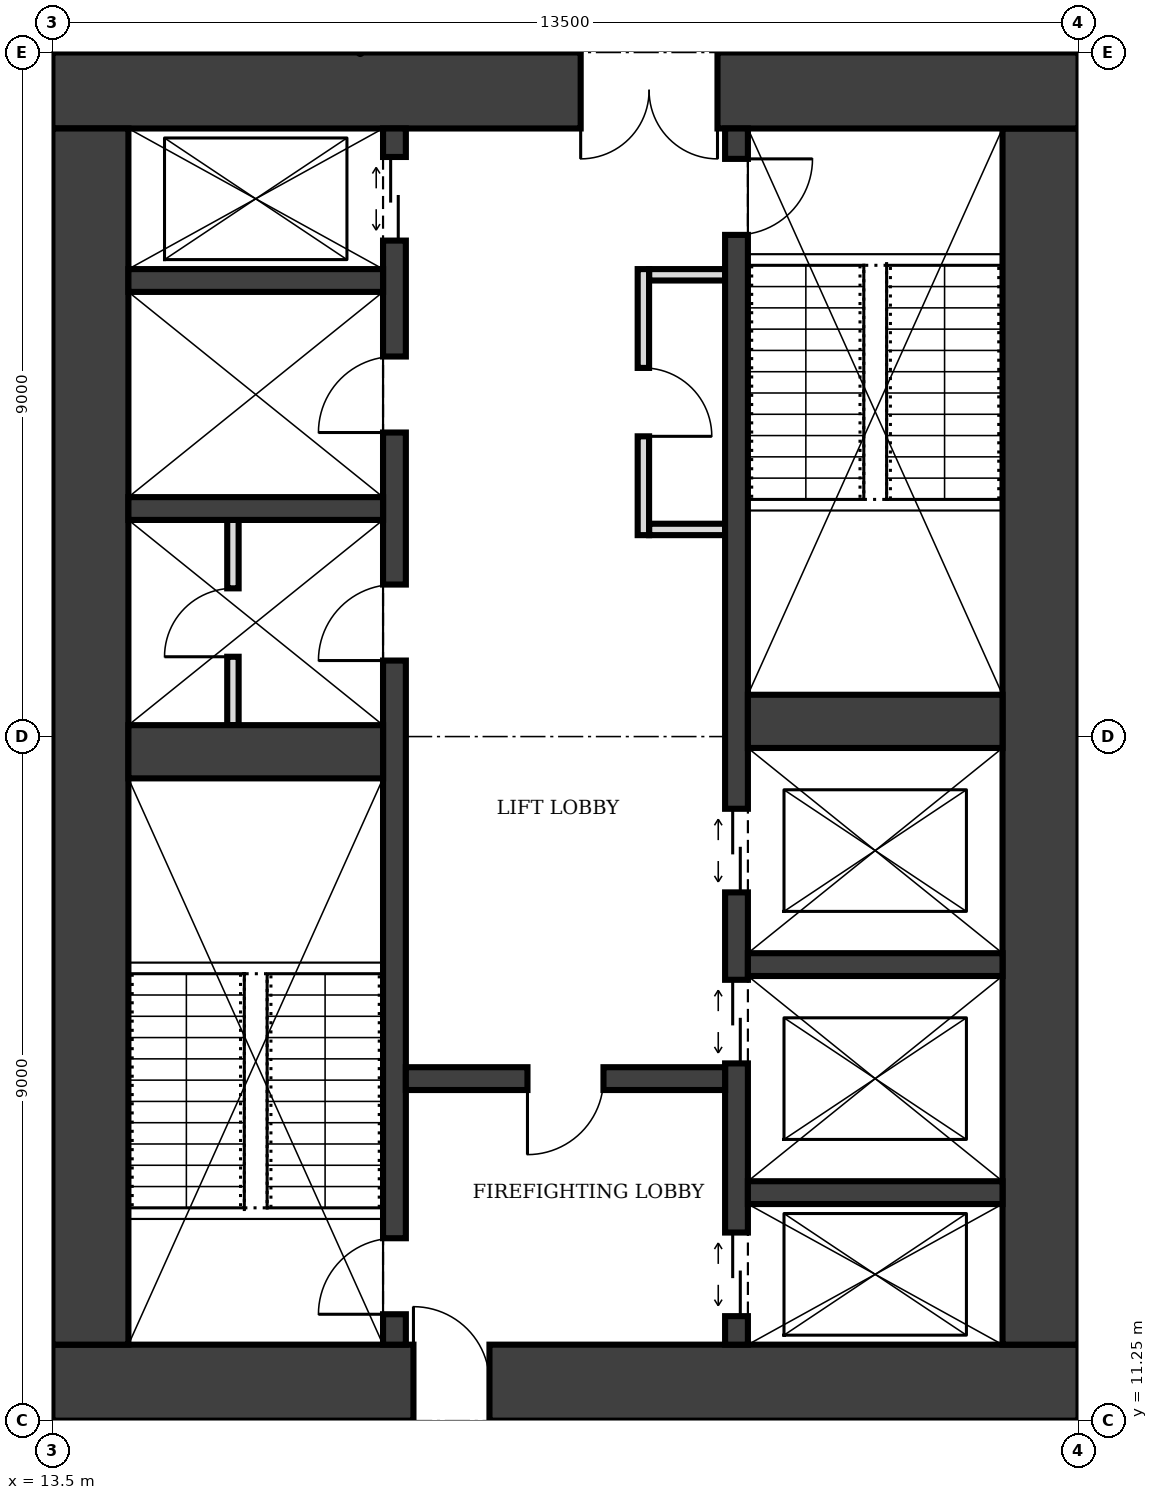
"""IFC4 building model, lengths in metres.
Left out: names, types, materials, properties, quantities, classifications, styles, units other than length and angle.
Written with IfcOpenShell. Run it as: python <this file> out.ifc"""

import sys

from ifc_helpers import new_model, si_unit, direction, frame, frame_2d, origin, place, context, subcontext, project, spatial, rectangle, extrude, element, fill, save


model = new_model("IFC4")
c1 = context("Model", 3, precision=1e-05, world=origin(), true_north=direction((0.0, 1.0)))
c2 = subcontext(c1, "Body", "Model", "MODEL_VIEW")
j1 = project(units=[si_unit("LENGTHUNIT", "METRE"), si_unit("PLANEANGLEUNIT", "RADIAN")], contexts=[c1])
p1 = place(None, origin())
s1 = spatial("IfcSite", under=j1, at=p1, CompositionType="ELEMENT")
p2 = place(p1, origin())
s2 = spatial("IfcBuilding", under=s1, at=p2, CompositionType="ELEMENT")
p3 = place(p2, frame((0.0, 0.0, 185.0)))
s3 = spatial("IfcBuildingStorey", under=s2, at=p3, CompositionType="ELEMENT", Elevation=185.0)
p4 = place(p3, frame((13.5, 11.75, 0.0), z_axis=(0.0, 0.0, 1.0), x_axis=(1.0, 0.0, 0.0)))
e1 = element("IfcWall", 1, at=p4, inside=s3, PredefinedType="SHEAR", context=c2, shape_type="SweptSolid", body=[
    extrude(rectangle(XDim=13.5, YDim=1.0, at=frame_2d((6.75, 0.0))), origin(), (0.0, 0.0, 1.0), 4.0),
])
p5 = place(p4, frame((4.75, 0.0, 0.0)))
e2 = element("IfcOpeningElement", 2, at=p5, cuts=e1, PredefinedType="OPENING", context=c2, shape_type="SweptSolid", body=[
    extrude(rectangle(XDim=1.0, YDim=2.1, at=frame_2d((0.5, 1.05))), frame((0.0, 0.51, 0.0), z_axis=(0.0, -1.0, 0.0), x_axis=(1.0, 0.0, 0.0)), (0.0, 0.0, 1.0), 1.02),
])
p6 = place(p3, frame((26.5, 12.25, 0.0), z_axis=(0.0, 0.0, 1.0), x_axis=(0.0, 1.0, 0.0)))
e3 = element("IfcWall", 3, at=p6, inside=s3, PredefinedType="SHEAR", context=c2, shape_type="SweptSolid", body=[
    extrude(rectangle(XDim=16.0, YDim=1.0, at=frame_2d((8.0, 0.0))), origin(), (0.0, 0.0, 1.0), 4.0),
])
p7 = place(p3, frame((27.0, 28.75, 0.0), z_axis=(0.0, 0.0, 1.0), x_axis=(-1.0, 0.0, 0.0)))
e4 = element("IfcWall", 4, at=p7, inside=s3, PredefinedType="SHEAR", context=c2, shape_type="SweptSolid", body=[
    extrude(rectangle(XDim=13.5, YDim=1.0, at=frame_2d((6.75, 0.0))), origin(), (0.0, 0.0, 1.0), 4.0),
])
p8 = place(p7, frame((4.75, 0.0, 0.0)))
e5 = element("IfcOpeningElement", 5, at=p8, cuts=e4, PredefinedType="OPENING", context=c2, shape_type="SweptSolid", body=[
    extrude(rectangle(XDim=1.8, YDim=2.1, at=frame_2d((0.9, 1.05))), frame((0.0, 0.51, 0.0), z_axis=(0.0, -1.0, 0.0), x_axis=(1.0, 0.0, 0.0)), (0.0, 0.0, 1.0), 1.02),
])
p9 = place(p3, frame((14.0, 28.25, 0.0), z_axis=(0.0, 0.0, 1.0), x_axis=(0.0, -1.0, 0.0)))
e6 = element("IfcWall", 6, at=p9, inside=s3, PredefinedType="SHEAR", context=c2, shape_type="SweptSolid", body=[
    extrude(rectangle(XDim=16.0, YDim=1.0, at=frame_2d((8.0, 0.0))), origin(), (0.0, 0.0, 1.0), 4.0),
])
p10 = place(p3, frame((18.0, 12.25, 0.0), z_axis=(0.0, 0.0, 1.0), x_axis=(0.0, 1.0, 0.0)))
e7 = element("IfcWall", 7, at=p10, inside=s3, PredefinedType="SHEAR", context=c2, shape_type="SweptSolid", body=[
    extrude(rectangle(XDim=16.0, YDim=0.3, at=frame_2d((8.0, 0.0))), origin(), (0.0, 0.0, 1.0), 4.0),
])
p11 = place(p10, frame((0.4, 0.0, 0.0)))
e8 = element("IfcOpeningElement", 8, at=p11, cuts=e7, PredefinedType="OPENING", context=c2, shape_type="SweptSolid", body=[
    extrude(rectangle(XDim=1.0, YDim=2.1, at=frame_2d((0.5, 1.05))), frame((0.0, 0.16, 0.0), z_axis=(0.0, -1.0, 0.0), x_axis=(1.0, 0.0, 0.0)), (0.0, 0.0, 1.0), 0.32),
])
p12 = place(p10, frame((14.525, 0.0, 0.0)))
e9 = element("IfcOpeningElement", 9, at=p12, cuts=e7, PredefinedType="OPENING", context=c2, shape_type="SweptSolid", body=[
    extrude(rectangle(XDim=1.1, YDim=2.1, at=frame_2d((0.55, 1.05))), frame((0.0, 0.16, 0.0), z_axis=(0.0, -1.0, 0.0), x_axis=(1.0, 0.0, 0.0)), (0.0, 0.0, 1.0), 0.32),
])
p13 = place(p10, frame((9.0, 0.0, 0.0)))
e10 = element("IfcOpeningElement", 10, at=p13, cuts=e7, PredefinedType="OPENING", context=c2, shape_type="SweptSolid", body=[
    extrude(rectangle(XDim=1.0, YDim=2.1, at=frame_2d((0.5, 1.05))), frame((0.0, 0.16, 0.0), z_axis=(0.0, -1.0, 0.0), x_axis=(1.0, 0.0, 0.0)), (0.0, 0.0, 1.0), 0.32),
])
p14 = place(p10, frame((12.0, 0.0, 0.0)))
e11 = element("IfcOpeningElement", 11, at=p14, cuts=e7, PredefinedType="OPENING", context=c2, shape_type="SweptSolid", body=[
    extrude(rectangle(XDim=1.0, YDim=2.1, at=frame_2d((0.5, 1.05))), frame((0.0, 0.16, 0.0), z_axis=(0.0, -1.0, 0.0), x_axis=(1.0, 0.0, 0.0)), (0.0, 0.0, 1.0), 0.32),
])
p15 = place(p3, frame((22.5, 12.25, 0.0), z_axis=(0.0, 0.0, 1.0), x_axis=(0.0, 1.0, 0.0)))
e12 = element("IfcWall", 12, at=p15, inside=s3, PredefinedType="SHEAR", context=c2, shape_type="SweptSolid", body=[
    extrude(rectangle(XDim=16.0, YDim=0.3, at=frame_2d((8.0, 0.0))), origin(), (0.0, 0.0, 1.0), 4.0),
])
p16 = place(p15, frame((14.6, 0.0, 0.0)))
e13 = element("IfcOpeningElement", 13, at=p16, cuts=e12, PredefinedType="OPENING", context=c2, shape_type="SweptSolid", body=[
    extrude(rectangle(XDim=1.0, YDim=2.1, at=frame_2d((0.5, 1.05))), frame((0.0, 0.16, 0.0), z_axis=(0.0, -1.0, 0.0), x_axis=(1.0, 0.0, 0.0)), (0.0, 0.0, 1.0), 0.32),
])
p17 = place(p15, frame((0.375, 0.0, 0.0)))
e14 = element("IfcOpeningElement", 14, at=p17, cuts=e12, PredefinedType="OPENING", context=c2, shape_type="SweptSolid", body=[
    extrude(rectangle(XDim=1.1, YDim=2.1, at=frame_2d((0.55, 1.05))), frame((0.0, 0.16, 0.0), z_axis=(0.0, -1.0, 0.0), x_axis=(1.0, 0.0, 0.0)), (0.0, 0.0, 1.0), 0.32),
])
p18 = place(p15, frame((3.7, 0.0, 0.0)))
e15 = element("IfcOpeningElement", 15, at=p18, cuts=e12, PredefinedType="OPENING", context=c2, shape_type="SweptSolid", body=[
    extrude(rectangle(XDim=1.1, YDim=2.1, at=frame_2d((0.55, 1.05))), frame((0.0, 0.16, 0.0), z_axis=(0.0, -1.0, 0.0), x_axis=(1.0, 0.0, 0.0)), (0.0, 0.0, 1.0), 0.32),
])
p19 = place(p15, frame((5.95, 0.0, 0.0)))
e16 = element("IfcOpeningElement", 16, at=p19, cuts=e12, PredefinedType="OPENING", context=c2, shape_type="SweptSolid", body=[
    extrude(rectangle(XDim=1.1, YDim=2.1, at=frame_2d((0.55, 1.05))), frame((0.0, 0.16, 0.0), z_axis=(0.0, -1.0, 0.0), x_axis=(1.0, 0.0, 0.0)), (0.0, 0.0, 1.0), 0.32),
])
p20 = place(p3, frame((14.5, 20.05, 0.0), z_axis=(0.0, 0.0, 1.0), x_axis=(1.0, 0.0, 0.0)))
e17 = element("IfcWall", 17, at=p20, inside=s3, PredefinedType="SHEAR", context=c2, shape_type="SweptSolid", body=[
    extrude(rectangle(XDim=3.35, YDim=0.7, at=frame_2d((1.675, 0.0))), origin(), (0.0, 0.0, 1.0), 4.0),
])
p21 = place(p3, frame((18.15, 15.75, 0.0), z_axis=(0.0, 0.0, 1.0), x_axis=(1.0, 0.0, 0.0)))
e18 = element("IfcWall", 18, at=p21, inside=s3, PredefinedType="SHEAR", context=c2, shape_type="SweptSolid", body=[
    extrude(rectangle(XDim=4.2, YDim=0.3, at=frame_2d((2.1, 0.0))), origin(), (0.0, 0.0, 1.0), 4.0),
])
p22 = place(p21, frame((1.6, 0.0, 0.0)))
e19 = element("IfcOpeningElement", 19, at=p22, cuts=e18, PredefinedType="OPENING", context=c2, shape_type="SweptSolid", body=[
    extrude(rectangle(XDim=1.0, YDim=2.1, at=frame_2d((0.5, 1.05))), frame((0.0, 0.16, 0.0), z_axis=(0.0, -1.0, 0.0), x_axis=(1.0, 0.0, 0.0)), (0.0, 0.0, 1.0), 0.32),
])
for number, where, z_axis, x_axis in (
    (20, (22.65, 14.25, 0.0), (0.0, 0.0, 1.0), (1.0, 0.0, 0.0)),
    (21, (22.65, 17.25, 0.0), (0.0, 0.0, 1.0), (1.0, 0.0, 0.0)),
):
    element("IfcWall", number, at=place(p3, frame(where, z_axis=z_axis, x_axis=x_axis)), inside=s3, PredefinedType="SHEAR", context=c2, shape_type="SweptSolid", body=[
        extrude(rectangle(XDim=3.35, YDim=0.3, at=frame_2d((1.675, 0.0))), origin(), (0.0, 0.0, 1.0), 4.0),
    ])
p23 = place(p3, frame((22.65, 20.45, 0.0), z_axis=(0.0, 0.0, 1.0), x_axis=(1.0, 0.0, 0.0)))
e22 = element("IfcWall", 22, at=p23, inside=s3, PredefinedType="SHEAR", context=c2, shape_type="SweptSolid", body=[
    extrude(rectangle(XDim=3.35, YDim=0.7, at=frame_2d((1.675, 0.0))), origin(), (0.0, 0.0, 1.0), 4.0),
])
for number, where, z_axis, x_axis in (
    (23, (14.5, 23.25, 0.0), (0.0, 0.0, 1.0), (1.0, 0.0, 0.0)),
    (24, (14.5, 26.25, 0.0), (0.0, 0.0, 1.0), (1.0, 0.0, 0.0)),
):
    element("IfcWall", number, at=place(p3, frame(where, z_axis=z_axis, x_axis=x_axis)), inside=s3, PredefinedType="SHEAR", context=c2, shape_type="SweptSolid", body=[
        extrude(rectangle(XDim=3.35, YDim=0.3, at=frame_2d((1.675, 0.0))), origin(), (0.0, 0.0, 1.0), 4.0),
    ])
p24 = place(p3, frame((21.275, 22.9, 0.0), z_axis=(0.0, 0.0, 1.0), x_axis=(0.0, 1.0, 0.0)))
e25 = element("IfcWall", 25, at=p24, inside=s3, PredefinedType="PARTITIONING", context=c2, shape_type="SweptSolid", body=[
    extrude(rectangle(XDim=3.5, YDim=0.15, at=frame_2d((1.75, 0.0))), origin(), (0.0, 0.0, 1.0), 3.75),
])
p25 = place(p24, frame((1.3, 0.0, 0.0)))
e26 = element("IfcOpeningElement", 26, at=p25, cuts=e25, PredefinedType="OPENING", context=c2, shape_type="SweptSolid", body=[
    extrude(rectangle(XDim=0.9, YDim=2.1, at=frame_2d((0.45, 1.05))), frame((0.0, 0.085, 0.0), z_axis=(0.0, -1.0, 0.0), x_axis=(1.0, 0.0, 0.0)), (0.0, 0.0, 1.0), 0.17),
])
for number, where, z_axis, x_axis in (
    (27, (21.35, 22.975, 0.0), (0.0, 0.0, 1.0), (1.0, 0.0, 0.0)),
    (28, (21.35, 26.325, 0.0), (0.0, 0.0, 1.0), (1.0, 0.0, 0.0)),
):
    element("IfcWall", number, at=place(p3, frame(where, z_axis=z_axis, x_axis=x_axis)), inside=s3, PredefinedType="PARTITIONING", context=c2, shape_type="SweptSolid", body=[
        extrude(rectangle(XDim=1.0, YDim=0.15, at=frame_2d((0.5, 0.0))), origin(), (0.0, 0.0, 1.0), 3.75),
    ])
p26 = place(p3, frame((15.875, 20.4, 0.0), z_axis=(0.0, 0.0, 1.0), x_axis=(0.0, 1.0, 0.0)))
e29 = element("IfcWall", 29, at=p26, inside=s3, PredefinedType="PARTITIONING", context=c2, shape_type="SweptSolid", body=[
    extrude(rectangle(XDim=2.7, YDim=0.15, at=frame_2d((1.35, 0.0))), origin(), (0.0, 0.0, 1.0), 3.75),
])
p27 = place(p26, frame((0.9, 0.0, 0.0)))
e30 = element("IfcOpeningElement", 30, at=p27, cuts=e29, PredefinedType="OPENING", context=c2, shape_type="SweptSolid", body=[
    extrude(rectangle(XDim=0.9, YDim=2.1, at=frame_2d((0.45, 1.05))), frame((0.0, 0.085, 0.0), z_axis=(0.0, -1.0, 0.0), x_axis=(1.0, 0.0, 0.0)), (0.0, 0.0, 1.0), 0.17),
])
p28 = place(p5, origin())
e31 = element("IfcDoor", 31, at=p28, inside=s3, OperationType="SINGLE_SWING_LEFT", PredefinedType="DOOR", context=c2, shape_type="SweptSolid", body=[
    extrude(rectangle(XDim=1.0, YDim=2.1, at=frame_2d((0.5, 1.05))), frame((0.0, 0.025, 0.0), z_axis=(0.0, -1.0, 0.0), x_axis=(1.0, 0.0, 0.0)), (0.0, 0.0, 1.0), 0.05),
])
fill(e2, e31)
p29 = place(p8, origin())
e32 = element("IfcDoor", 32, at=p29, inside=s3, OperationType="DOUBLE_DOOR_SINGLE_SWING", PredefinedType="DOOR", context=c2, shape_type="SweptSolid", body=[
    extrude(rectangle(XDim=1.8, YDim=2.1, at=frame_2d((0.9, 1.05))), frame((0.0, 0.025, 0.0), z_axis=(0.0, -1.0, 0.0), x_axis=(1.0, 0.0, 0.0)), (0.0, 0.0, 1.0), 0.05),
])
fill(e5, e32)
p30 = place(p22, frame((1.0, 0.0, 0.0), z_axis=(0.0, 0.0, 1.0), x_axis=(-1.0, 0.0, 0.0)))
e33 = element("IfcDoor", 33, at=p30, inside=s3, OperationType="SINGLE_SWING_RIGHT", PredefinedType="DOOR", context=c2, shape_type="SweptSolid", body=[
    extrude(rectangle(XDim=1.0, YDim=2.1, at=frame_2d((0.5, 1.05))), frame((0.0, 0.025, 0.0), z_axis=(0.0, -1.0, 0.0), x_axis=(1.0, 0.0, 0.0)), (0.0, 0.0, 1.0), 0.05),
])
fill(e19, e33)
p31 = place(p11, origin())
e34 = element("IfcDoor", 34, at=p31, inside=s3, OperationType="SINGLE_SWING_LEFT", PredefinedType="DOOR", context=c2, shape_type="SweptSolid", body=[
    extrude(rectangle(XDim=1.0, YDim=2.1, at=frame_2d((0.5, 1.05))), frame((0.0, 0.025, 0.0), z_axis=(0.0, -1.0, 0.0), x_axis=(1.0, 0.0, 0.0)), (0.0, 0.0, 1.0), 0.05),
])
fill(e8, e34)
p32 = place(p16, frame((1.0, 0.0, 0.0), z_axis=(0.0, 0.0, 1.0), x_axis=(-1.0, 0.0, 0.0)))
e35 = element("IfcDoor", 35, at=p32, inside=s3, OperationType="SINGLE_SWING_LEFT", PredefinedType="DOOR", context=c2, shape_type="SweptSolid", body=[
    extrude(rectangle(XDim=1.0, YDim=2.1, at=frame_2d((0.5, 1.05))), frame((0.0, 0.025, 0.0), z_axis=(0.0, -1.0, 0.0), x_axis=(1.0, 0.0, 0.0)), (0.0, 0.0, 1.0), 0.05),
])
fill(e13, e35)
p33 = place(p17, origin())
e36 = element("IfcDoor", 36, at=p33, inside=s3, OperationType="DOUBLE_DOOR_SLIDING", PredefinedType="DOOR", context=c2, shape_type="SweptSolid", body=[
    extrude(rectangle(XDim=1.1, YDim=2.1, at=frame_2d((0.55, 1.05))), frame((0.0, 0.025, 0.0), z_axis=(0.0, -1.0, 0.0), x_axis=(1.0, 0.0, 0.0)), (0.0, 0.0, 1.0), 0.05),
])
fill(e14, e36)
p34 = place(p12, origin())
e37 = element("IfcDoor", 37, at=p34, inside=s3, OperationType="DOUBLE_DOOR_SLIDING", PredefinedType="DOOR", context=c2, shape_type="SweptSolid", body=[
    extrude(rectangle(XDim=1.1, YDim=2.1, at=frame_2d((0.55, 1.05))), frame((0.0, 0.025, 0.0), z_axis=(0.0, -1.0, 0.0), x_axis=(1.0, 0.0, 0.0)), (0.0, 0.0, 1.0), 0.05),
])
fill(e9, e37)
p35 = place(p18, origin())
e38 = element("IfcDoor", 38, at=p35, inside=s3, OperationType="DOUBLE_DOOR_SLIDING", PredefinedType="DOOR", context=c2, shape_type="SweptSolid", body=[
    extrude(rectangle(XDim=1.1, YDim=2.1, at=frame_2d((0.55, 1.05))), frame((0.0, 0.025, 0.0), z_axis=(0.0, -1.0, 0.0), x_axis=(1.0, 0.0, 0.0)), (0.0, 0.0, 1.0), 0.05),
])
fill(e15, e38)
p36 = place(p19, origin())
e39 = element("IfcDoor", 39, at=p36, inside=s3, OperationType="DOUBLE_DOOR_SLIDING", PredefinedType="DOOR", context=c2, shape_type="SweptSolid", body=[
    extrude(rectangle(XDim=1.1, YDim=2.1, at=frame_2d((0.55, 1.05))), frame((0.0, 0.025, 0.0), z_axis=(0.0, -1.0, 0.0), x_axis=(1.0, 0.0, 0.0)), (0.0, 0.0, 1.0), 0.05),
])
fill(e16, e39)
p37 = place(p25, frame((0.9, 0.0, 0.0), z_axis=(0.0, 0.0, 1.0), x_axis=(-1.0, 0.0, 0.0)))
e40 = element("IfcDoor", 40, at=p37, inside=s3, OperationType="SINGLE_SWING_RIGHT", PredefinedType="DOOR", context=c2, shape_type="SweptSolid", body=[
    extrude(rectangle(XDim=0.9, YDim=2.1, at=frame_2d((0.45, 1.05))), frame((0.0, 0.025, 0.0), z_axis=(0.0, -1.0, 0.0), x_axis=(1.0, 0.0, 0.0)), (0.0, 0.0, 1.0), 0.05),
])
fill(e26, e40)
p38 = place(p13, origin())
e41 = element("IfcDoor", 41, at=p38, inside=s3, OperationType="SINGLE_SWING_LEFT", PredefinedType="DOOR", context=c2, shape_type="SweptSolid", body=[
    extrude(rectangle(XDim=1.0, YDim=2.1, at=frame_2d((0.5, 1.05))), frame((0.0, 0.025, 0.0), z_axis=(0.0, -1.0, 0.0), x_axis=(1.0, 0.0, 0.0)), (0.0, 0.0, 1.0), 0.05),
])
fill(e10, e41)
p39 = place(p27, origin())
e42 = element("IfcDoor", 42, at=p39, inside=s3, OperationType="SINGLE_SWING_LEFT", PredefinedType="DOOR", context=c2, shape_type="SweptSolid", body=[
    extrude(rectangle(XDim=0.9, YDim=2.1, at=frame_2d((0.45, 1.05))), frame((0.0, 0.025, 0.0), z_axis=(0.0, -1.0, 0.0), x_axis=(1.0, 0.0, 0.0)), (0.0, 0.0, 1.0), 0.05),
])
fill(e30, e42)
p40 = place(p14, origin())
e43 = element("IfcDoor", 43, at=p40, inside=s3, OperationType="SINGLE_SWING_LEFT", PredefinedType="DOOR", context=c2, shape_type="SweptSolid", body=[
    extrude(rectangle(XDim=1.0, YDim=2.1, at=frame_2d((0.5, 1.05))), frame((0.0, 0.025, 0.0), z_axis=(0.0, -1.0, 0.0), x_axis=(1.0, 0.0, 0.0)), (0.0, 0.0, 1.0), 0.05),
])
fill(e11, e43)
save(model, sys.argv[1])
